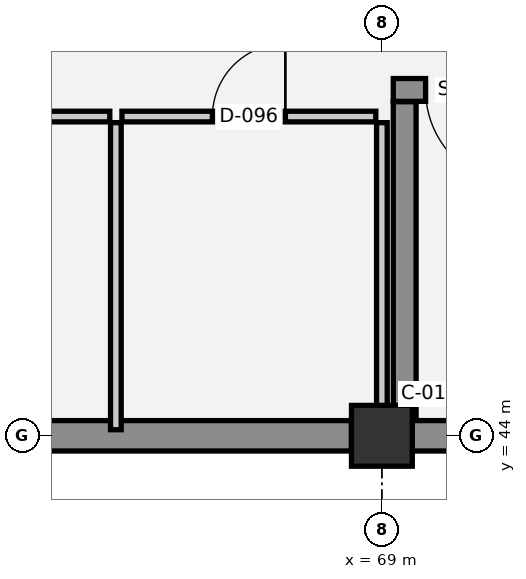
"""IFC4 building model, lengths in metres.
Left out: names, types, materials, properties, quantities, classifications, styles, units other than length and angle.
Written with IfcOpenShell. Run it as: python <this file> out.ifc"""

import sys

from ifc_helpers import new_model, si_unit, direction, frame, frame_2d, origin, origin_2d, place, context, subcontext, project, spatial, rectangle, extrude, element, fill, save


model = new_model("IFC4")
c1 = context("Model", 3, precision=1e-05, world=origin(), true_north=direction((0.0, 1.0)))
c2 = subcontext(c1, "Body", "Model", "MODEL_VIEW")
j1 = project(units=[si_unit("LENGTHUNIT", "METRE"), si_unit("PLANEANGLEUNIT", "RADIAN")], contexts=[c1])
p1 = place(None, origin())
s1 = spatial("IfcSite", under=j1, at=p1, CompositionType="ELEMENT")
p2 = place(p1, origin())
s2 = spatial("IfcBuilding", under=s1, at=p2, CompositionType="ELEMENT")
p3 = place(p2, frame((0.0, 0.0, -4.5)))
s3 = spatial("IfcBuildingStorey", under=s2, at=p3, CompositionType="ELEMENT", Elevation=-4.5)
p4 = place(p3, frame((69.0, 44.0, 0.0), z_axis=(0.0, 0.0, 1.0), x_axis=(1.0, 0.0, 0.0)))
e1 = element("IfcColumn", 1, at=p4, inside=s3, PredefinedType="COLUMN", context=c2, shape_type="SweptSolid", body=[
    extrude(rectangle(XDim=0.8, YDim=0.8, at=origin_2d()), origin(), (0.0, 0.0, 1.0), 4.5),
])
p5 = place(p3, frame((76.6, 44.0, 0.0), z_axis=(0.0, 0.0, 1.0), x_axis=(-1.0, 0.0, 0.0)))
e2 = element("IfcWall", 2, at=p5, inside=s3, PredefinedType="STANDARD", context=c2, shape_type="SweptSolid", body=[
    extrude(rectangle(XDim=7.2, YDim=0.4, at=frame_2d((3.6, 0.0))), origin(), (0.0, 0.0, 1.0), 4.2),
])
p6 = place(p3, frame((68.6, 44.0, 0.0), z_axis=(0.0, 0.0, 1.0), x_axis=(-1.0, 0.0, 0.0)))
e3 = element("IfcWall", 3, at=p6, inside=s3, PredefinedType="STANDARD", context=c2, shape_type="SweptSolid", body=[
    extrude(rectangle(XDim=6.2, YDim=0.4, at=frame_2d((3.1, 0.0))), origin(), (0.0, 0.0, 1.0), 4.2),
])
p7 = place(p3, frame((76.85, 48.55, 0.0), z_axis=(0.0, 0.0, 1.0), x_axis=(-1.0, 0.0, 0.0)))
e4 = element("IfcWall", 4, at=p7, inside=s3, PredefinedType="SHEAR", context=c2, shape_type="SweptSolid", body=[
    extrude(rectangle(XDim=7.7, YDim=0.3, at=frame_2d((3.85, 0.0))), origin(), (0.0, 0.0, 1.0), 4.2),
])
p8 = place(p7, frame((6.025, 0.0, 0.0)))
e5 = element("IfcOpeningElement", 5, at=p8, cuts=e4, PredefinedType="OPENING", context=c2, shape_type="SweptSolid", body=[
    extrude(rectangle(XDim=1.25, YDim=2.15, at=frame_2d((0.625, 1.075))), frame((0.0, 0.16, 0.0), z_axis=(0.0, -1.0, 0.0), x_axis=(1.0, 0.0, 0.0)), (0.0, 0.0, 1.0), 0.32),
])
p9 = place(p3, frame((69.3, 48.395, 0.0), z_axis=(0.0, 0.0, 1.0), x_axis=(0.0, -1.0, 0.0)))
e6 = element("IfcWall", 6, at=p9, inside=s3, PredefinedType="SHEAR", context=c2, shape_type="SweptSolid", body=[
    extrude(rectangle(XDim=4.19, YDim=0.3, at=frame_2d((2.095, 0.0))), origin(), (0.0, 0.0, 1.0), 4.2),
])
p10 = place(p3, frame((62.08, 48.2, 0.0), z_axis=(0.0, 0.0, 1.0), x_axis=(1.0, 0.0, 0.0)))
e7 = element("IfcWall", 7, at=p10, inside=s3, PredefinedType="PLUMBINGWALL", context=c2, shape_type="SweptSolid", body=[
    extrude(rectangle(XDim=3.34, YDim=0.14, at=frame_2d((1.67, 0.0))), origin(), (0.0, 0.0, 1.0), 4.14),
])
p11 = place(p10, frame((1.21, 0.0, 0.0)))
e8 = element("IfcOpeningElement", 8, at=p11, cuts=e7, PredefinedType="OPENING", context=c2, shape_type="SweptSolid", body=[
    extrude(rectangle(XDim=0.92, YDim=2.1, at=frame_2d((0.46, 1.05))), frame((0.0, 0.08, 0.0), z_axis=(0.0, -1.0, 0.0), x_axis=(1.0, 0.0, 0.0)), (0.0, 0.0, 1.0), 0.16),
])
p12 = place(p3, frame((65.58, 48.2, 0.0), z_axis=(0.0, 0.0, 1.0), x_axis=(1.0, 0.0, 0.0)))
e9 = element("IfcWall", 9, at=p12, inside=s3, PredefinedType="PLUMBINGWALL", context=c2, shape_type="SweptSolid", body=[
    extrude(rectangle(XDim=3.34, YDim=0.14, at=frame_2d((1.67, 0.0))), origin(), (0.0, 0.0, 1.0), 4.14),
])
p13 = place(p12, frame((1.19, 0.0, 0.0)))
e10 = element("IfcOpeningElement", 10, at=p13, cuts=e9, PredefinedType="OPENING", context=c2, shape_type="SweptSolid", body=[
    extrude(rectangle(XDim=0.96, YDim=2.1, at=frame_2d((0.48, 1.05))), frame((0.0, 0.08, 0.0), z_axis=(0.0, -1.0, 0.0), x_axis=(1.0, 0.0, 0.0)), (0.0, 0.0, 1.0), 0.16),
])
p14 = place(p3, frame((65.5, 44.08, 0.0), z_axis=(0.0, 0.0, 1.0), x_axis=(0.0, 1.0, 0.0)))
e11 = element("IfcWall", 11, at=p14, inside=s3, PredefinedType="PLUMBINGWALL", context=c2, shape_type="SweptSolid", body=[
    extrude(rectangle(XDim=4.04, YDim=0.14, at=frame_2d((2.02, 0.0))), origin(), (0.0, 0.0, 1.0), 4.14),
])
p15 = place(p3, frame((69.0, 44.08, 0.0), z_axis=(0.0, 0.0, 1.0), x_axis=(0.0, 1.0, 0.0)))
e12 = element("IfcWall", 12, at=p15, inside=s3, PredefinedType="PLUMBINGWALL", context=c2, shape_type="SweptSolid", body=[
    extrude(rectangle(XDim=4.04, YDim=0.14, at=frame_2d((2.02, 0.0))), origin(), (0.0, 0.0, 1.0), 3.5),
])
p16 = place(p8, origin())
e13 = element("IfcDoor", 13, at=p16, inside=s3, OperationType="SINGLE_SWING_LEFT", PredefinedType="DOOR", context=c2, shape_type="SweptSolid", body=[
    extrude(rectangle(XDim=1.25, YDim=2.15, at=frame_2d((0.625, 1.075))), frame((0.0, 0.025, 0.0), z_axis=(0.0, -1.0, 0.0), x_axis=(1.0, 0.0, 0.0)), (0.0, 0.0, 1.0), 0.05),
])
fill(e5, e13)
p17 = place(p13, origin())
e14 = element("IfcDoor", 14, at=p17, inside=s3, OperationType="SINGLE_SWING_RIGHT", PredefinedType="DOOR", context=c2, shape_type="SweptSolid", body=[
    extrude(rectangle(XDim=0.96, YDim=2.1, at=frame_2d((0.48, 1.05))), frame((0.0, 0.025, 0.0), z_axis=(0.0, -1.0, 0.0), x_axis=(1.0, 0.0, 0.0)), (0.0, 0.0, 1.0), 0.05),
])
fill(e10, e14)
save(model, sys.argv[1])
